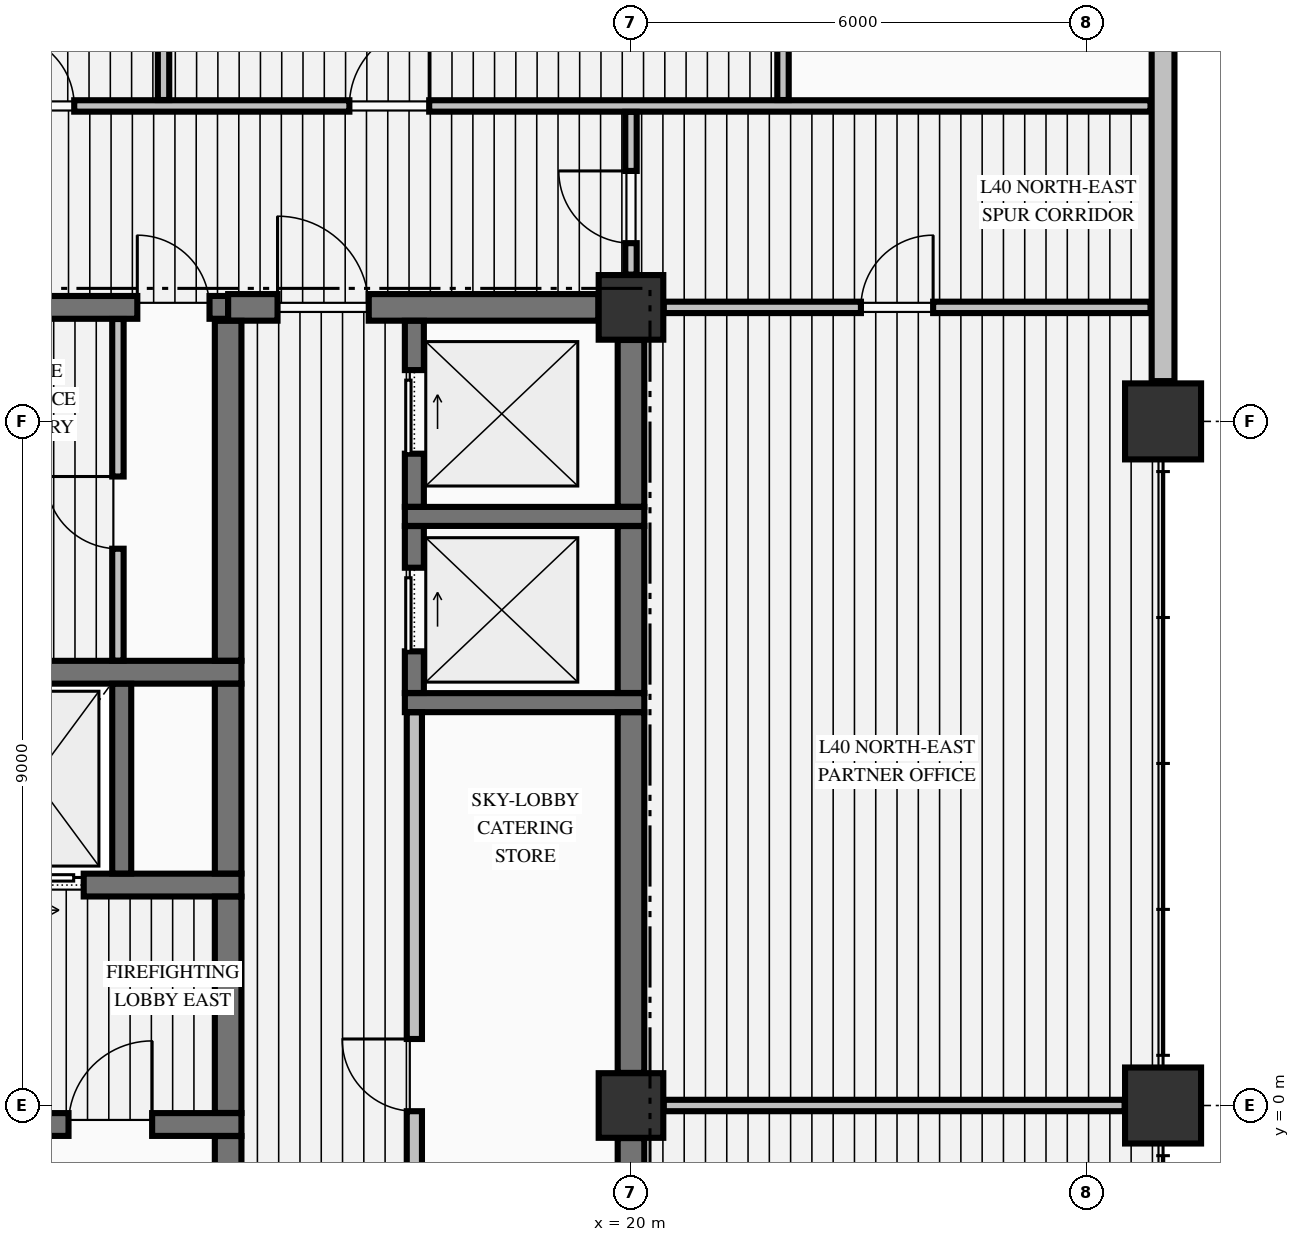
"""IFC4 building model, lengths in metres.
Left out: names, types, materials, properties, quantities, classifications, styles, units other than length and angle.
Written with IfcOpenShell. Run it as: python <this file> out.ifc"""

import sys

from ifc_helpers import new_model, si_unit, direction, frame, frame_2d, origin, origin_2d, place, context, subcontext, project, spatial, rectangle, extrude, element, fill, save


model = new_model("IFC4")
c1 = context("Model", 3, precision=1e-05, world=origin(), true_north=direction((0.0, 1.0)))
c2 = subcontext(c1, "Body", "Model", "MODEL_VIEW")
j1 = project(units=[si_unit("LENGTHUNIT", "METRE"), si_unit("PLANEANGLEUNIT", "RADIAN")], contexts=[c1])
p1 = place(None, origin())
s1 = spatial("IfcSite", under=j1, at=p1, CompositionType="ELEMENT")
p2 = place(p1, origin())
s2 = spatial("IfcBuilding", under=s1, at=p2, CompositionType="ELEMENT")
p3 = place(p2, frame((0.0, 0.0, 158.24)))
s3 = spatial("IfcBuildingStorey", under=s2, at=p3, CompositionType="ELEMENT", Elevation=158.24)
for number, where, z_axis, x_axis in (
    (1, (27.0, 0.0, -0.425), (0.0, 0.0, 1.0), (1.0, 0.0, 0.0)),
    (2, (27.0, 9.0, -0.425), (0.0, 0.0, 1.0), (1.0, 0.0, 0.0)),
):
    element("IfcColumn", number, at=place(p3, frame(where, z_axis=z_axis, x_axis=x_axis)), inside=s3, PredefinedType="COLUMN", context=c2, shape_type="SweptSolid", body=[
        extrude(rectangle(XDim=1.0, YDim=1.0, at=origin_2d()), origin(), (0.0, 0.0, 1.0), 4.595),
    ])
for number, where, z_axis, x_axis in (
    (3, (20.0, 10.5, -0.425), (0.0, 0.0, 1.0), (1.0, 0.0, 0.0)),
    (4, (20.0, 0.0, -0.425), (0.0, 0.0, 1.0), (1.0, 0.0, 0.0)),
):
    element("IfcColumn", number, at=place(p3, frame(where, z_axis=z_axis, x_axis=x_axis)), inside=s3, PredefinedType="COLUMN", context=c2, shape_type="SweptSolid", body=[
        extrude(rectangle(XDim=0.85, YDim=0.85, at=origin_2d()), origin(), (0.0, 0.0, 1.0), 4.595),
    ])
p4 = place(p3, frame((27.0, 9.53, 0.0), z_axis=(0.0, 0.0, 1.0), x_axis=(0.0, 1.0, 0.0)))
e5 = element("IfcWall", 5, at=p4, inside=s3, PredefinedType="STANDARD", context=c2, shape_type="SweptSolid", body=[
    extrude(rectangle(XDim=9.44, YDim=0.3, at=frame_2d((4.72, 0.0))), origin(), (0.0, 0.0, 1.0), 1.962),
])
p5 = place(p3, frame((11.429, -0.25, 0.0), z_axis=(0.0, 0.0, 1.0), x_axis=(1.0, 0.0, 0.0)))
e6 = element("IfcWall", 6, at=p5, inside=s3, PredefinedType="SHEAR", context=c2, shape_type="SweptSolid", body=[
    extrude(rectangle(XDim=3.446, YDim=0.3, at=frame_2d((1.723, 0.0))), origin(), (0.0, 0.0, 1.0), 4.17),
])
p6 = place(p5, frame((1.171, 0.0, 0.0)))
e7 = element("IfcOpeningElement", 7, at=p6, cuts=e6, PredefinedType="OPENING", context=c2, shape_type="SweptSolid", body=[
    extrude(rectangle(XDim=1.1, YDim=2.15, at=frame_2d((0.55, 1.075))), frame((0.0, 0.16, 0.0), z_axis=(0.0, -1.0, 0.0), x_axis=(1.0, 0.0, 0.0)), (0.0, 0.0, 1.0), 0.32),
])
p7 = place(p3, frame((10.85, 2.9, 0.0), z_axis=(0.0, 0.0, 1.0), x_axis=(1.0, 0.0, 0.0)))
e8 = element("IfcWall", 8, at=p7, inside=s3, PredefinedType="SHEAR", context=c2, shape_type="SweptSolid", body=[
    extrude(rectangle(XDim=4.025, YDim=0.3, at=frame_2d((2.012, 0.0))), origin(), (0.0, 0.0, 1.0), 4.17),
])
p8 = place(p7, frame((0.85, 0.0, 0.0)))
e9 = element("IfcOpeningElement", 9, at=p8, cuts=e8, PredefinedType="OPENING", context=c2, shape_type="SweptSolid", body=[
    extrude(rectangle(XDim=1.1, YDim=2.2, at=frame_2d((0.55, 1.1))), frame((0.0, 0.16, 0.0), z_axis=(0.0, -1.0, 0.0), x_axis=(1.0, 0.0, 0.0)), (0.0, 0.0, 1.0), 0.32),
])
p9 = place(p3, frame((17.025, 5.3, 0.0), z_axis=(0.0, 0.0, 1.0), x_axis=(1.0, 0.0, 0.0)))
e10 = element("IfcWall", 10, at=p9, inside=s3, PredefinedType="SOLIDWALL", context=c2, shape_type="SweptSolid", body=[
    extrude(rectangle(XDim=3.15, YDim=0.25, at=frame_2d((1.575, 0.0))), origin(), (0.0, 0.0, 1.0), 4.17),
])
p10 = place(p3, frame((10.85, 5.7, 0.0), z_axis=(0.0, 0.0, 1.0), x_axis=(1.0, 0.0, 0.0)))
e11 = element("IfcWall", 11, at=p10, inside=s3, PredefinedType="SHEAR", context=c2, shape_type="SweptSolid", body=[
    extrude(rectangle(XDim=4.025, YDim=0.3, at=frame_2d((2.012, 0.0))), origin(), (0.0, 0.0, 1.0), 4.17),
])
p11 = place(p3, frame((17.025, 7.75, 0.0), z_axis=(0.0, 0.0, 1.0), x_axis=(1.0, 0.0, 0.0)))
e12 = element("IfcWall", 12, at=p11, inside=s3, PredefinedType="SOLIDWALL", context=c2, shape_type="SweptSolid", body=[
    extrude(rectangle(XDim=3.15, YDim=0.25, at=frame_2d((1.575, 0.0))), origin(), (0.0, 0.0, 1.0), 4.17),
])
p12 = place(p3, frame((11.429, 10.5, 0.0), z_axis=(0.0, 0.0, 1.0), x_axis=(1.0, 0.0, 0.0)))
e13 = element("IfcWall", 13, at=p12, inside=s3, PredefinedType="SHEAR", context=c2, shape_type="SweptSolid", body=[
    extrude(rectangle(XDim=3.271, YDim=0.3, at=frame_2d((1.635, 0.0))), origin(), (0.0, 0.0, 1.0), 4.17),
])
p13 = place(p12, frame((2.076, 0.0, 0.0)))
e14 = element("IfcOpeningElement", 14, at=p13, cuts=e13, PredefinedType="OPENING", context=c2, shape_type="SweptSolid", body=[
    extrude(rectangle(XDim=0.95, YDim=2.15, at=frame_2d((0.475, 1.075))), frame((0.0, 0.16, 0.0), z_axis=(0.0, -1.0, 0.0), x_axis=(1.0, 0.0, 0.0)), (0.0, 0.0, 1.0), 0.32),
])
p14 = place(p3, frame((14.7, 10.5, 0.0), z_axis=(0.0, 0.0, 1.0), x_axis=(1.0, 0.0, 0.0)))
e15 = element("IfcWall", 15, at=p14, inside=s3, PredefinedType="SHEAR", context=c2, shape_type="SweptSolid", body=[
    extrude(rectangle(XDim=4.871, YDim=0.35, at=frame_2d((2.436, 0.0))), origin(), (0.0, 0.0, 1.0), 4.17),
])
p15 = place(p14, frame((0.65, 0.0, 0.0)))
e16 = element("IfcOpeningElement", 16, at=p15, cuts=e15, PredefinedType="OPENING", context=c2, shape_type="SweptSolid", body=[
    extrude(rectangle(XDim=1.2, YDim=2.15, at=frame_2d((0.6, 1.075))), frame((0.0, 0.185, 0.0), z_axis=(0.0, -1.0, 0.0), x_axis=(1.0, 0.0, 0.0)), (0.0, 0.0, 1.0), 0.37),
])
p16 = place(p3, frame((20.431, 0.0, 0.0), z_axis=(0.0, 0.0, 1.0), x_axis=(1.0, 0.0, 0.0)))
e17 = element("IfcWall", 17, at=p16, inside=s3, PredefinedType="PARTITIONING", context=c2, shape_type="SweptSolid", body=[
    extrude(rectangle(XDim=6.063, YDim=0.15, at=frame_2d((3.031, 0.0))), origin(), (0.0, 0.0, 1.0), 2.362),
])
p17 = place(p3, frame((20.431, 10.5, 0.0), z_axis=(0.0, 0.0, 1.0), x_axis=(1.0, 0.0, 0.0)))
e18 = element("IfcWall", 18, at=p17, inside=s3, PredefinedType="PARTITIONING", context=c2, shape_type="SweptSolid", body=[
    extrude(rectangle(XDim=6.404, YDim=0.15, at=frame_2d((3.202, 0.0))), origin(), (0.0, 0.0, 1.0), 4.17),
])
p18 = place(p17, frame((2.594, 0.0, 0.0)))
e19 = element("IfcOpeningElement", 19, at=p18, cuts=e18, PredefinedType="OPENING", context=c2, shape_type="SweptSolid", body=[
    extrude(rectangle(XDim=0.95, YDim=2.15, at=frame_2d((0.475, 1.075))), frame((0.0, 0.085, 0.0), z_axis=(0.0, -1.0, 0.0), x_axis=(1.0, 0.0, 0.0)), (0.0, 0.0, 1.0), 0.17),
])
p19 = place(p3, frame((-20.075, 13.15, 0.0), z_axis=(0.0, 0.0, 1.0), x_axis=(1.0, 0.0, 0.0)))
e20 = element("IfcWall", 20, at=p19, inside=s3, PredefinedType="PARTITIONING", context=c2, shape_type="SweptSolid", body=[
    extrude(rectangle(XDim=46.91, YDim=0.15, at=frame_2d((23.455, 0.0))), origin(), (0.0, 0.0, 1.0), 4.17),
])
p20 = place(p19, frame((11.75, 0.0, 0.0)))
e21 = element("IfcOpeningElement", 21, at=p20, cuts=e20, PredefinedType="OPENING", context=c2, shape_type="SweptSolid", body=[
    extrude(rectangle(XDim=1.05, YDim=2.15, at=frame_2d((0.525, 1.075))), frame((0.0, 0.085, 0.0), z_axis=(0.0, -1.0, 0.0), x_axis=(1.0, 0.0, 0.0)), (0.0, 0.0, 1.0), 0.17),
])
p21 = place(p19, frame((16.45, 0.0, 0.0)))
e22 = element("IfcOpeningElement", 22, at=p21, cuts=e20, PredefinedType="OPENING", context=c2, shape_type="SweptSolid", body=[
    extrude(rectangle(XDim=0.95, YDim=2.15, at=frame_2d((0.475, 1.075))), frame((0.0, 0.085, 0.0), z_axis=(0.0, -1.0, 0.0), x_axis=(1.0, 0.0, 0.0)), (0.0, 0.0, 1.0), 0.17),
])
p22 = place(p19, frame((22.95, 0.0, 0.0)))
e23 = element("IfcOpeningElement", 23, at=p22, cuts=e20, PredefinedType="OPENING", context=c2, shape_type="SweptSolid", body=[
    extrude(rectangle(XDim=0.95, YDim=2.15, at=frame_2d((0.475, 1.075))), frame((0.0, 0.085, 0.0), z_axis=(0.0, -1.0, 0.0), x_axis=(1.0, 0.0, 0.0)), (0.0, 0.0, 1.0), 0.17),
])
p23 = place(p19, frame((31.8, 0.0, 0.0)))
e24 = element("IfcOpeningElement", 24, at=p23, cuts=e20, PredefinedType="OPENING", context=c2, shape_type="SweptSolid", body=[
    extrude(rectangle(XDim=0.95, YDim=2.15, at=frame_2d((0.475, 1.075))), frame((0.0, 0.085, 0.0), z_axis=(0.0, -1.0, 0.0), x_axis=(1.0, 0.0, 0.0)), (0.0, 0.0, 1.0), 0.17),
])
p24 = place(p19, frame((36.37, 0.0, 0.0)))
e25 = element("IfcOpeningElement", 25, at=p24, cuts=e20, PredefinedType="OPENING", context=c2, shape_type="SweptSolid", body=[
    extrude(rectangle(XDim=1.05, YDim=2.15, at=frame_2d((0.525, 1.075))), frame((0.0, 0.085, 0.0), z_axis=(0.0, -1.0, 0.0), x_axis=(1.0, 0.0, 0.0)), (0.0, 0.0, 1.0), 0.17),
])
p25 = place(p3, frame((13.3, 3.052, 0.0), z_axis=(0.0, 0.0, 1.0), x_axis=(0.0, 1.0, 0.0)))
e26 = element("IfcWall", 26, at=p25, inside=s3, PredefinedType="SOLIDWALL", context=c2, shape_type="SweptSolid", body=[
    extrude(rectangle(XDim=2.496, YDim=0.25, at=frame_2d((1.248, 0.0))), origin(), (0.0, 0.0, 1.0), 4.17),
])
p26 = place(p3, frame((14.7, -9.773, 0.0), z_axis=(0.0, 0.0, 1.0), x_axis=(0.0, 1.0, 0.0)))
e27 = element("IfcWall", 27, at=p26, inside=s3, PredefinedType="SHEAR", context=c2, shape_type="SweptSolid", body=[
    extrude(rectangle(XDim=9.371, YDim=0.35, at=frame_2d((4.686, 0.0))), origin(), (0.0, 0.0, 1.0), 4.17),
])
p27 = place(p3, frame((14.7, -0.098, 0.0), z_axis=(0.0, 0.0, 1.0), x_axis=(0.0, 1.0, 0.0)))
e28 = element("IfcWall", 28, at=p27, inside=s3, PredefinedType="SHEAR", context=c2, shape_type="SweptSolid", body=[
    extrude(rectangle(XDim=2.846, YDim=0.35, at=frame_2d((1.423, 0.0))), origin(), (0.0, 0.0, 1.0), 4.17),
])
p28 = place(p3, frame((14.7, 3.052, 0.0), z_axis=(0.0, 0.0, 1.0), x_axis=(0.0, 1.0, 0.0)))
e29 = element("IfcWall", 29, at=p28, inside=s3, PredefinedType="SHEAR", context=c2, shape_type="SweptSolid", body=[
    extrude(rectangle(XDim=2.496, YDim=0.35, at=frame_2d((1.248, 0.0))), origin(), (0.0, 0.0, 1.0), 4.17),
])
p29 = place(p3, frame((14.7, 5.852, 0.0), z_axis=(0.0, 0.0, 1.0), x_axis=(0.0, 1.0, 0.0)))
e30 = element("IfcWall", 30, at=p29, inside=s3, PredefinedType="SHEAR", context=c2, shape_type="SweptSolid", body=[
    extrude(rectangle(XDim=4.471, YDim=0.35, at=frame_2d((2.235, 0.0))), origin(), (0.0, 0.0, 1.0), 4.17),
])
p30 = place(p3, frame((17.15, 5.427, 0.0), z_axis=(0.0, 0.0, 1.0), x_axis=(0.0, 1.0, 0.0)))
e31 = element("IfcWall", 31, at=p30, inside=s3, PredefinedType="SOLIDWALL", context=c2, shape_type="SweptSolid", body=[
    extrude(rectangle(XDim=2.196, YDim=0.25, at=frame_2d((1.098, 0.0))), origin(), (0.0, 0.0, 1.0), 4.17),
])
p31 = place(p30, frame((0.548, 0.0, 0.0)))
e32 = element("IfcOpeningElement", 32, at=p31, cuts=e31, PredefinedType="OPENING", context=c2, shape_type="SweptSolid", body=[
    extrude(rectangle(XDim=1.1, YDim=2.2, at=frame_2d((0.55, 1.1))), frame((0.0, 0.135, 0.0), z_axis=(0.0, -1.0, 0.0), x_axis=(1.0, 0.0, 0.0)), (0.0, 0.0, 1.0), 0.27),
])
p32 = place(p3, frame((17.15, 7.877, 0.0), z_axis=(0.0, 0.0, 1.0), x_axis=(0.0, 1.0, 0.0)))
e33 = element("IfcWall", 33, at=p32, inside=s3, PredefinedType="SOLIDWALL", context=c2, shape_type="SweptSolid", body=[
    extrude(rectangle(XDim=2.446, YDim=0.25, at=frame_2d((1.223, 0.0))), origin(), (0.0, 0.0, 1.0), 4.17),
])
p33 = place(p32, frame((0.698, 0.0, 0.0)))
e34 = element("IfcOpeningElement", 34, at=p33, cuts=e33, PredefinedType="OPENING", context=c2, shape_type="SweptSolid", body=[
    extrude(rectangle(XDim=1.1, YDim=2.2, at=frame_2d((0.55, 1.1))), frame((0.0, 0.135, 0.0), z_axis=(0.0, -1.0, 0.0), x_axis=(1.0, 0.0, 0.0)), (0.0, 0.0, 1.0), 0.27),
])
p34 = place(p3, frame((20.0, -4.423, 0.0), z_axis=(0.0, 0.0, 1.0), x_axis=(0.0, 1.0, 0.0)))
e35 = element("IfcWall", 35, at=p34, inside=s3, PredefinedType="SHEAR", context=c2, shape_type="SweptSolid", body=[
    extrude(rectangle(XDim=3.994, YDim=0.35, at=frame_2d((1.997, 0.0))), origin(), (0.0, 0.0, 1.0), 4.17),
])
p35 = place(p3, frame((20.0, 0.429, 0.0), z_axis=(0.0, 0.0, 1.0), x_axis=(0.0, 1.0, 0.0)))
e36 = element("IfcWall", 36, at=p35, inside=s3, PredefinedType="SHEAR", context=c2, shape_type="SweptSolid", body=[
    extrude(rectangle(XDim=4.744, YDim=0.35, at=frame_2d((2.372, 0.0))), origin(), (0.0, 0.0, 1.0), 4.17),
])
p36 = place(p3, frame((20.0, 5.427, 0.0), z_axis=(0.0, 0.0, 1.0), x_axis=(0.0, 1.0, 0.0)))
e37 = element("IfcWall", 37, at=p36, inside=s3, PredefinedType="SHEAR", context=c2, shape_type="SweptSolid", body=[
    extrude(rectangle(XDim=2.196, YDim=0.35, at=frame_2d((1.098, 0.0))), origin(), (0.0, 0.0, 1.0), 4.17),
])
p37 = place(p3, frame((20.0, 7.877, 0.0), z_axis=(0.0, 0.0, 1.0), x_axis=(0.0, 1.0, 0.0)))
e38 = element("IfcWall", 38, at=p37, inside=s3, PredefinedType="SHEAR", context=c2, shape_type="SweptSolid", body=[
    extrude(rectangle(XDim=2.194, YDim=0.35, at=frame_2d((1.097, 0.0))), origin(), (0.0, 0.0, 1.0), 4.17),
])
p38 = place(p3, frame((13.25, 5.853, 0.0), z_axis=(0.0, 0.0, 1.0), x_axis=(0.0, 1.0, 0.0)))
e39 = element("IfcWall", 39, at=p38, inside=s3, PredefinedType="PARTITIONING", context=c2, shape_type="SweptSolid", body=[
    extrude(rectangle(XDim=4.494, YDim=0.15, at=frame_2d((2.247, 0.0))), origin(), (0.0, 0.0, 1.0), 4.17),
])
p39 = place(p38, frame((1.472, 0.0, 0.0)))
e40 = element("IfcOpeningElement", 40, at=p39, cuts=e39, PredefinedType="OPENING", context=c2, shape_type="SweptSolid", body=[
    extrude(rectangle(XDim=0.95, YDim=2.15, at=frame_2d((0.475, 1.075))), frame((0.0, 0.085, 0.0), z_axis=(0.0, -1.0, 0.0), x_axis=(1.0, 0.0, 0.0)), (0.0, 0.0, 1.0), 0.17),
])
p40 = place(p3, frame((13.85, 13.228, 0.0), z_axis=(0.0, 0.0, 1.0), x_axis=(0.0, 1.0, 0.0)))
e41 = element("IfcWall", 41, at=p40, inside=s3, PredefinedType="PARTITIONING", context=c2, shape_type="SweptSolid", body=[
    extrude(rectangle(XDim=11.107, YDim=0.15, at=frame_2d((5.553, 0.0))), origin(), (0.0, 0.0, 1.0), 4.17),
])
p41 = place(p3, frame((17.15, -4.422, 0.0), z_axis=(0.0, 0.0, 1.0), x_axis=(0.0, 1.0, 0.0)))
e42 = element("IfcWall", 42, at=p41, inside=s3, PredefinedType="PARTITIONING", context=c2, shape_type="SweptSolid", body=[
    extrude(rectangle(XDim=9.594, YDim=0.2, at=frame_2d((4.797, 0.0))), origin(), (0.0, 0.0, 1.0), 4.17),
])
p42 = place(p41, frame((4.347, 0.0, 0.0)))
e43 = element("IfcOpeningElement", 43, at=p42, cuts=e42, PredefinedType="OPENING", context=c2, shape_type="SweptSolid", body=[
    extrude(rectangle(XDim=0.95, YDim=2.15, at=frame_2d((0.475, 1.075))), frame((0.0, 0.11, 0.0), z_axis=(0.0, -1.0, 0.0), x_axis=(1.0, 0.0, 0.0)), (0.0, 0.0, 1.0), 0.22),
])
p43 = place(p3, frame((20.0, 10.931, 0.0), z_axis=(0.0, 0.0, 1.0), x_axis=(0.0, 1.0, 0.0)))
e44 = element("IfcWall", 44, at=p43, inside=s3, PredefinedType="PARTITIONING", context=c2, shape_type="SweptSolid", body=[
    extrude(rectangle(XDim=2.141, YDim=0.15, at=frame_2d((1.071, 0.0))), origin(), (0.0, 0.0, 1.0), 3.36),
])
p44 = place(p43, frame((0.414, 0.0, 0.0)))
e45 = element("IfcOpeningElement", 45, at=p44, cuts=e44, PredefinedType="OPENING", context=c2, shape_type="SweptSolid", body=[
    extrude(rectangle(XDim=0.95, YDim=2.15, at=frame_2d((0.475, 1.075))), frame((0.0, 0.085, 0.0), z_axis=(0.0, -1.0, 0.0), x_axis=(1.0, 0.0, 0.0)), (0.0, 0.0, 1.0), 0.17),
])
p45 = place(p3, frame((22.0, 13.228, 0.0), z_axis=(0.0, 0.0, 1.0), x_axis=(0.0, 1.0, 0.0)))
e46 = element("IfcWall", 46, at=p45, inside=s3, PredefinedType="PARTITIONING", context=c2, shape_type="SweptSolid", body=[
    extrude(rectangle(XDim=5.766, YDim=0.15, at=frame_2d((2.883, 0.0))), origin(), (0.0, 0.0, 1.0), 4.17),
])
p46 = place(p6, origin())
e47 = element("IfcDoor", 47, at=p46, inside=s3, OperationType="SINGLE_SWING_RIGHT", PredefinedType="DOOR", context=c2, shape_type="SweptSolid", body=[
    extrude(rectangle(XDim=1.1, YDim=2.15, at=frame_2d((0.55, 1.075))), frame((0.0, 0.025, 0.0), z_axis=(0.0, -1.0, 0.0), x_axis=(1.0, 0.0, 0.0)), (0.0, 0.0, 1.0), 0.05),
])
fill(e7, e47)
p47 = place(p8, origin())
e48 = element("IfcDoor", 48, at=p47, inside=s3, OperationType="SLIDING_TO_RIGHT", PredefinedType="DOOR", context=c2, shape_type="SweptSolid", body=[
    extrude(rectangle(XDim=1.1, YDim=2.2, at=frame_2d((0.55, 1.1))), frame((0.0, 0.025, 0.0), z_axis=(0.0, -1.0, 0.0), x_axis=(1.0, 0.0, 0.0)), (0.0, 0.0, 1.0), 0.05),
])
fill(e9, e48)
p48 = place(p13, origin())
e49 = element("IfcDoor", 49, at=p48, inside=s3, OperationType="SINGLE_SWING_LEFT", PredefinedType="DOOR", context=c2, shape_type="SweptSolid", body=[
    extrude(rectangle(XDim=0.95, YDim=2.15, at=frame_2d((0.475, 1.075))), frame((0.0, 0.025, 0.0), z_axis=(0.0, -1.0, 0.0), x_axis=(1.0, 0.0, 0.0)), (0.0, 0.0, 1.0), 0.05),
])
fill(e14, e49)
p49 = place(p39, origin())
e50 = element("IfcDoor", 50, at=p49, inside=s3, OperationType="SINGLE_SWING_RIGHT", PredefinedType="DOOR", context=c2, shape_type="SweptSolid", body=[
    extrude(rectangle(XDim=0.95, YDim=2.15, at=frame_2d((0.475, 1.075))), frame((0.0, 0.025, 0.0), z_axis=(0.0, -1.0, 0.0), x_axis=(1.0, 0.0, 0.0)), (0.0, 0.0, 1.0), 0.05),
])
fill(e40, e50)
p50 = place(p31, origin())
e51 = element("IfcDoor", 51, at=p50, inside=s3, OperationType="SLIDING_TO_RIGHT", PredefinedType="DOOR", context=c2, shape_type="SweptSolid", body=[
    extrude(rectangle(XDim=1.1, YDim=2.2, at=frame_2d((0.55, 1.1))), frame((0.0, 0.025, 0.0), z_axis=(0.0, -1.0, 0.0), x_axis=(1.0, 0.0, 0.0)), (0.0, 0.0, 1.0), 0.05),
])
fill(e32, e51)
p51 = place(p33, origin())
e52 = element("IfcDoor", 52, at=p51, inside=s3, OperationType="SLIDING_TO_RIGHT", PredefinedType="DOOR", context=c2, shape_type="SweptSolid", body=[
    extrude(rectangle(XDim=1.1, YDim=2.2, at=frame_2d((0.55, 1.1))), frame((0.0, 0.025, 0.0), z_axis=(0.0, -1.0, 0.0), x_axis=(1.0, 0.0, 0.0)), (0.0, 0.0, 1.0), 0.05),
])
fill(e34, e52)
p52 = place(p15, origin())
e53 = element("IfcDoor", 53, at=p52, inside=s3, OperationType="SINGLE_SWING_LEFT", PredefinedType="DOOR", context=c2, shape_type="SweptSolid", body=[
    extrude(rectangle(XDim=1.2, YDim=2.15, at=frame_2d((0.6, 1.075))), frame((0.0, 0.025, 0.0), z_axis=(0.0, -1.0, 0.0), x_axis=(1.0, 0.0, 0.0)), (0.0, 0.0, 1.0), 0.05),
])
fill(e16, e53)
p53 = place(p42, origin())
e54 = element("IfcDoor", 54, at=p53, inside=s3, OperationType="SINGLE_SWING_RIGHT", PredefinedType="DOOR", context=c2, shape_type="SweptSolid", body=[
    extrude(rectangle(XDim=0.95, YDim=2.15, at=frame_2d((0.475, 1.075))), frame((0.0, 0.025, 0.0), z_axis=(0.0, -1.0, 0.0), x_axis=(1.0, 0.0, 0.0)), (0.0, 0.0, 1.0), 0.05),
])
fill(e43, e54)
p54 = place(p23, origin())
e55 = element("IfcDoor", 55, at=p54, inside=s3, OperationType="SINGLE_SWING_LEFT", PredefinedType="DOOR", context=c2, shape_type="SweptSolid", body=[
    extrude(rectangle(XDim=0.95, YDim=2.15, at=frame_2d((0.475, 1.075))), frame((0.0, 0.025, 0.0), z_axis=(0.0, -1.0, 0.0), x_axis=(1.0, 0.0, 0.0)), (0.0, 0.0, 1.0), 0.05),
])
fill(e24, e55)
p55 = place(p24, origin())
e56 = element("IfcDoor", 56, at=p55, inside=s3, OperationType="SINGLE_SWING_RIGHT", PredefinedType="DOOR", context=c2, shape_type="SweptSolid", body=[
    extrude(rectangle(XDim=1.05, YDim=2.15, at=frame_2d((0.525, 1.075))), frame((0.0, 0.025, 0.0), z_axis=(0.0, -1.0, 0.0), x_axis=(1.0, 0.0, 0.0)), (0.0, 0.0, 1.0), 0.05),
])
fill(e25, e56)
p56 = place(p44, origin())
e57 = element("IfcDoor", 57, at=p56, inside=s3, OperationType="SINGLE_SWING_RIGHT", PredefinedType="DOOR", context=c2, shape_type="SweptSolid", body=[
    extrude(rectangle(XDim=0.95, YDim=2.15, at=frame_2d((0.475, 1.075))), frame((0.0, 0.025, 0.0), z_axis=(0.0, -1.0, 0.0), x_axis=(1.0, 0.0, 0.0)), (0.0, 0.0, 1.0), 0.05),
])
fill(e45, e57)
p57 = place(p18, origin())
e58 = element("IfcDoor", 58, at=p57, inside=s3, OperationType="SINGLE_SWING_RIGHT", PredefinedType="DOOR", context=c2, shape_type="SweptSolid", body=[
    extrude(rectangle(XDim=0.95, YDim=2.15, at=frame_2d((0.475, 1.075))), frame((0.0, 0.025, 0.0), z_axis=(0.0, -1.0, 0.0), x_axis=(1.0, 0.0, 0.0)), (0.0, 0.0, 1.0), 0.05),
])
fill(e19, e58)
save(model, sys.argv[1])
